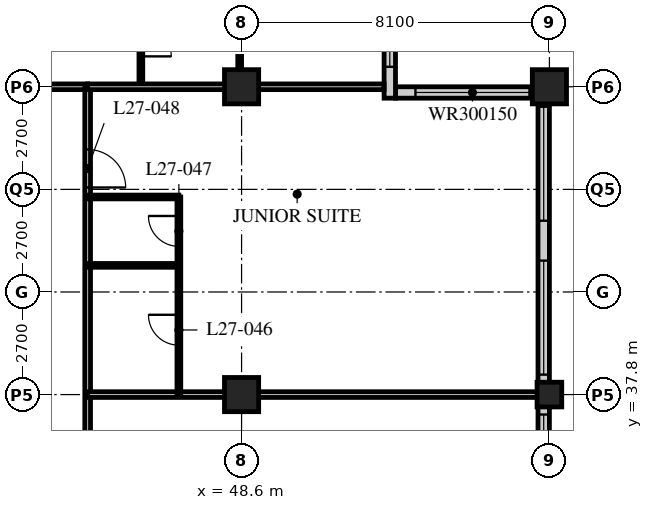
"""IFC4 building model, lengths in metres.
Left out: names, types, materials, properties, quantities, classifications, styles, units other than length and angle.
Written with IfcOpenShell. Run it as: python <this file> out.ifc"""

import sys

from ifc_helpers import new_model, si_unit, direction, frame, frame_2d, origin, origin_2d, place, context, subcontext, project, spatial, rectangle, hollow_rectangle, extrude, element, fill, save


model = new_model("IFC4")
c1 = context("Model", 3, precision=1e-05, world=origin(), true_north=direction((0.0, 1.0)))
c2 = subcontext(c1, "Body", "Model", "MODEL_VIEW")
j1 = project(units=[si_unit("LENGTHUNIT", "METRE"), si_unit("PLANEANGLEUNIT", "RADIAN")], contexts=[c1])
p1 = place(None, origin())
s1 = spatial("IfcSite", under=j1, at=p1, CompositionType="ELEMENT")
p2 = place(p1, origin())
s2 = spatial("IfcBuilding", under=s1, at=p2, CompositionType="ELEMENT")
p3 = place(p2, frame((0.0, 0.0, 110.2)))
s3 = spatial("IfcBuildingStorey", under=s2, at=p3, CompositionType="ELEMENT", Elevation=110.2)
for number, where, z_axis, x_axis in (
    (1, (48.6, 37.8, 0.0), (0.0, 0.0, 1.0), (1.0, 0.0, 0.0)),
    (2, (48.6, 45.9, 0.0), (0.0, 0.0, 1.0), (1.0, 0.0, 0.0)),
):
    element("IfcColumn", number, at=place(p3, frame(where, z_axis=z_axis, x_axis=x_axis)), inside=s3, PredefinedType="COLUMN", context=c2, shape_type="SweptSolid", body=[
        extrude(hollow_rectangle(XDim=0.9, YDim=0.9, WallThickness=0.09, at=origin_2d()), origin(), (0.0, 0.0, 1.0), 3.4),
    ])
p4 = place(p3, frame((56.7, 37.8, 0.0), z_axis=(0.0, 0.0, 1.0), x_axis=(1.0, 0.0, 0.0)))
e3 = element("IfcColumn", 3, at=p4, inside=s3, PredefinedType="COLUMN", context=c2, shape_type="SweptSolid", body=[
    extrude(hollow_rectangle(XDim=0.65, YDim=0.65, WallThickness=0.055, at=origin_2d()), origin(), (0.0, 0.0, 1.0), 3.4),
])
p5 = place(p3, frame((56.7, 45.9, 0.0), z_axis=(0.0, 0.0, 1.0), x_axis=(1.0, 0.0, 0.0)))
e4 = element("IfcColumn", 4, at=p5, inside=s3, PredefinedType="COLUMN", context=c2, shape_type="SweptSolid", body=[
    extrude(hollow_rectangle(XDim=0.9, YDim=0.9, WallThickness=0.09, at=origin_2d()), origin(), (0.0, 0.0, 1.0), 3.4),
])
p6 = place(p3, frame((56.55, 13.8, 0.0), z_axis=(0.0, 0.0, 1.0), x_axis=(0.0, 1.0, 0.0)))
e5 = element("IfcWall", 5, at=p6, inside=s3, PredefinedType="SOLIDWALL", context=c2, shape_type="SweptSolid", body=[
    extrude(rectangle(XDim=32.1, YDim=0.3, at=frame_2d((16.05, 0.0))), origin(), (0.0, 0.0, 1.0), 3.19),
])
p7 = place(p6, frame((0.225, 0.0, 0.9)))
e6 = element("IfcOpeningElement", 6, at=p7, cuts=e5, PredefinedType="OPENING", context=c2, shape_type="SweptSolid", body=[
    extrude(rectangle(XDim=3.0, YDim=2.0, at=frame_2d((1.5, 1.0))), frame((0.0, 0.16, 0.0), z_axis=(0.0, -1.0, 0.0), x_axis=(1.0, 0.0, 0.0)), (0.0, 0.0, 1.0), 0.32),
])
p8 = place(p6, frame((4.275, 0.0, 0.9)))
e7 = element("IfcOpeningElement", 7, at=p8, cuts=e5, PredefinedType="OPENING", context=c2, shape_type="SweptSolid", body=[
    extrude(rectangle(XDim=3.0, YDim=2.0, at=frame_2d((1.5, 1.0))), frame((0.0, 0.16, 0.0), z_axis=(0.0, -1.0, 0.0), x_axis=(1.0, 0.0, 0.0)), (0.0, 0.0, 1.0), 0.32),
])
p9 = place(p6, frame((8.325, 0.0, 0.9)))
e8 = element("IfcOpeningElement", 8, at=p9, cuts=e5, PredefinedType="OPENING", context=c2, shape_type="SweptSolid", body=[
    extrude(rectangle(XDim=3.0, YDim=2.0, at=frame_2d((1.5, 1.0))), frame((0.0, 0.16, 0.0), z_axis=(0.0, -1.0, 0.0), x_axis=(1.0, 0.0, 0.0)), (0.0, 0.0, 1.0), 0.32),
])
p10 = place(p6, frame((12.375, 0.0, 0.9)))
e9 = element("IfcOpeningElement", 9, at=p10, cuts=e5, PredefinedType="OPENING", context=c2, shape_type="SweptSolid", body=[
    extrude(rectangle(XDim=3.0, YDim=2.0, at=frame_2d((1.5, 1.0))), frame((0.0, 0.16, 0.0), z_axis=(0.0, -1.0, 0.0), x_axis=(1.0, 0.0, 0.0)), (0.0, 0.0, 1.0), 0.32),
])
p11 = place(p6, frame((16.425, 0.0, 0.9)))
e10 = element("IfcOpeningElement", 10, at=p11, cuts=e5, PredefinedType="OPENING", context=c2, shape_type="SweptSolid", body=[
    extrude(rectangle(XDim=3.0, YDim=2.0, at=frame_2d((1.5, 1.0))), frame((0.0, 0.16, 0.0), z_axis=(0.0, -1.0, 0.0), x_axis=(1.0, 0.0, 0.0)), (0.0, 0.0, 1.0), 0.32),
])
p12 = place(p6, frame((20.475, 0.0, 0.9)))
e11 = element("IfcOpeningElement", 11, at=p12, cuts=e5, PredefinedType="OPENING", context=c2, shape_type="SweptSolid", body=[
    extrude(rectangle(XDim=3.0, YDim=2.0, at=frame_2d((1.5, 1.0))), frame((0.0, 0.16, 0.0), z_axis=(0.0, -1.0, 0.0), x_axis=(1.0, 0.0, 0.0)), (0.0, 0.0, 1.0), 0.32),
])
p13 = place(p6, frame((24.525, 0.0, 0.9)))
e12 = element("IfcOpeningElement", 12, at=p13, cuts=e5, PredefinedType="OPENING", context=c2, shape_type="SweptSolid", body=[
    extrude(rectangle(XDim=3.0, YDim=2.0, at=frame_2d((1.5, 1.0))), frame((0.0, 0.16, 0.0), z_axis=(0.0, -1.0, 0.0), x_axis=(1.0, 0.0, 0.0)), (0.0, 0.0, 1.0), 0.32),
])
p14 = place(p6, frame((28.575, 0.0, 0.9)))
e13 = element("IfcOpeningElement", 13, at=p14, cuts=e5, PredefinedType="OPENING", context=c2, shape_type="SweptSolid", body=[
    extrude(rectangle(XDim=3.0, YDim=2.0, at=frame_2d((1.5, 1.0))), frame((0.0, 0.16, 0.0), z_axis=(0.0, -1.0, 0.0), x_axis=(1.0, 0.0, 0.0)), (0.0, 0.0, 1.0), 0.32),
])
p15 = place(p3, frame((56.4, 45.75, 0.0), z_axis=(0.0, 0.0, 1.0), x_axis=(-1.0, 0.0, 0.0)))
e14 = element("IfcWall", 14, at=p15, inside=s3, PredefinedType="SOLIDWALL", context=c2, shape_type="SweptSolid", body=[
    extrude(rectangle(XDim=3.75, YDim=0.3, at=frame_2d((1.875, 0.0))), origin(), (0.0, 0.0, 1.0), 3.19),
])
p16 = place(p15, frame((0.225, 0.0, 0.9)))
e15 = element("IfcOpeningElement", 15, at=p16, cuts=e14, PredefinedType="OPENING", context=c2, shape_type="SweptSolid", body=[
    extrude(rectangle(XDim=3.0, YDim=1.5, at=frame_2d((1.5, 0.75))), frame((0.0, 0.16, 0.0), z_axis=(0.0, -1.0, 0.0), x_axis=(1.0, 0.0, 0.0)), (0.0, 0.0, 1.0), 0.32),
])
p17 = place(p3, frame((52.5, 45.6, 0.0), z_axis=(0.0, 0.0, 1.0), x_axis=(0.0, 1.0, 0.0)))
e16 = element("IfcWall", 16, at=p17, inside=s3, PredefinedType="SOLIDWALL", context=c2, shape_type="SweptSolid", body=[
    extrude(rectangle(XDim=4.35, YDim=0.3, at=frame_2d((2.175, 0.0))), origin(), (0.0, 0.0, 1.0), 3.19),
])
p18 = place(p17, frame((0.825, 0.0, 0.9)))
e17 = element("IfcOpeningElement", 17, at=p18, cuts=e16, PredefinedType="OPENING", context=c2, shape_type="SweptSolid", body=[
    extrude(rectangle(XDim=3.0, YDim=1.5, at=frame_2d((1.5, 0.75))), frame((0.0, 0.16, 0.0), z_axis=(0.0, -1.0, 0.0), x_axis=(1.0, 0.0, 0.0)), (0.0, 0.0, 1.0), 0.32),
])
p19 = place(p3, frame((12.15, 45.9, 0.0), z_axis=(0.0, 0.0, 1.0), x_axis=(1.0, 0.0, 0.0)))
e18 = element("IfcWall", 18, at=p19, inside=s3, PredefinedType="PARTITIONING", context=c2, shape_type="SweptSolid", body=[
    extrude(rectangle(XDim=32.4, YDim=0.15, at=frame_2d((16.2, 0.0))), origin(), (0.0, 0.0, 1.0), 2.578),
])
p20 = place(p19, frame((9.5, 0.0, 0.0)))
e19 = element("IfcOpeningElement", 19, at=p20, cuts=e18, PredefinedType="OPENING", context=c2, shape_type="SweptSolid", body=[
    extrude(rectangle(XDim=1.0, YDim=2.1, at=frame_2d((0.5, 1.05))), frame((0.0, 0.085, 0.0), z_axis=(0.0, -1.0, 0.0), x_axis=(1.0, 0.0, 0.0)), (0.0, 0.0, 1.0), 0.17),
])
p21 = place(p19, frame((17.6, 0.0, 0.0)))
e20 = element("IfcOpeningElement", 20, at=p21, cuts=e18, PredefinedType="OPENING", context=c2, shape_type="SweptSolid", body=[
    extrude(rectangle(XDim=1.0, YDim=2.1, at=frame_2d((0.5, 1.05))), frame((0.0, 0.085, 0.0), z_axis=(0.0, -1.0, 0.0), x_axis=(1.0, 0.0, 0.0)), (0.0, 0.0, 1.0), 0.17),
])
p22 = place(p19, frame((25.7, 0.0, 0.0)))
e21 = element("IfcOpeningElement", 21, at=p22, cuts=e18, PredefinedType="OPENING", context=c2, shape_type="SweptSolid", body=[
    extrude(rectangle(XDim=1.0, YDim=2.1, at=frame_2d((0.5, 1.05))), frame((0.0, 0.085, 0.0), z_axis=(0.0, -1.0, 0.0), x_axis=(1.0, 0.0, 0.0)), (0.0, 0.0, 1.0), 0.17),
])
p23 = place(p19, frame((29.875, 0.0, 0.0)))
e22 = element("IfcOpeningElement", 22, at=p23, cuts=e18, PredefinedType="OPENING", context=c2, shape_type="SweptSolid", body=[
    extrude(rectangle(XDim=1.0, YDim=2.1, at=frame_2d((0.5, 1.05))), frame((0.0, 0.085, 0.0), z_axis=(0.0, -1.0, 0.0), x_axis=(1.0, 0.0, 0.0)), (0.0, 0.0, 1.0), 0.17),
])
p24 = place(p19, frame((1.525, 0.0, 0.0)))
e23 = element("IfcOpeningElement", 23, at=p24, cuts=e18, PredefinedType="OPENING", context=c2, shape_type="SweptSolid", body=[
    extrude(rectangle(XDim=1.0, YDim=2.1, at=frame_2d((0.5, 1.05))), frame((0.0, 0.085, 0.0), z_axis=(0.0, -1.0, 0.0), x_axis=(1.0, 0.0, 0.0)), (0.0, 0.0, 1.0), 0.17),
])
p25 = place(p3, frame((44.55, 21.6, 0.0), z_axis=(0.0, 0.0, 1.0), x_axis=(0.0, 1.0, 0.0)))
e24 = element("IfcWall", 24, at=p25, inside=s3, PredefinedType="PARTITIONING", context=c2, shape_type="SweptSolid", body=[
    extrude(rectangle(XDim=24.3, YDim=0.15, at=frame_2d((12.15, 0.0))), origin(), (0.0, 0.0, 1.0), 3.19),
])
p26 = place(p25, frame((2.75, 0.0, 0.0)))
e25 = element("IfcOpeningElement", 25, at=p26, cuts=e24, PredefinedType="OPENING", context=c2, shape_type="SweptSolid", body=[
    extrude(rectangle(XDim=1.0, YDim=2.1, at=frame_2d((0.5, 1.05))), frame((0.0, 0.085, 0.0), z_axis=(0.0, -1.0, 0.0), x_axis=(1.0, 0.0, 0.0)), (0.0, 0.0, 1.0), 0.17),
])
p27 = place(p25, frame((6.5, 0.0, 0.0)))
e26 = element("IfcOpeningElement", 26, at=p27, cuts=e24, PredefinedType="OPENING", context=c2, shape_type="SweptSolid", body=[
    extrude(rectangle(XDim=1.0, YDim=2.1, at=frame_2d((0.5, 1.05))), frame((0.0, 0.085, 0.0), z_axis=(0.0, -1.0, 0.0), x_axis=(1.0, 0.0, 0.0)), (0.0, 0.0, 1.0), 0.17),
])
p28 = place(p25, frame((13.55, 0.0, 0.0)))
e27 = element("IfcOpeningElement", 27, at=p28, cuts=e24, PredefinedType="OPENING", context=c2, shape_type="SweptSolid", body=[
    extrude(rectangle(XDim=1.0, YDim=2.1, at=frame_2d((0.5, 1.05))), frame((0.0, 0.085, 0.0), z_axis=(0.0, -1.0, 0.0), x_axis=(1.0, 0.0, 0.0)), (0.0, 0.0, 1.0), 0.17),
])
p29 = place(p25, frame((21.65, 0.0, 0.0)))
e28 = element("IfcOpeningElement", 28, at=p29, cuts=e24, PredefinedType="OPENING", context=c2, shape_type="SweptSolid", body=[
    extrude(rectangle(XDim=1.0, YDim=2.1, at=frame_2d((0.5, 1.05))), frame((0.0, 0.085, 0.0), z_axis=(0.0, -1.0, 0.0), x_axis=(1.0, 0.0, 0.0)), (0.0, 0.0, 1.0), 0.17),
])
p30 = place(p3, frame((44.55, 37.8, 0.0), z_axis=(0.0, 0.0, 1.0), x_axis=(1.0, 0.0, 0.0)))
e29 = element("IfcWall", 29, at=p30, inside=s3, PredefinedType="PARTITIONING", context=c2, shape_type="SweptSolid", body=[
    extrude(rectangle(XDim=11.85, YDim=0.15, at=frame_2d((5.925, 0.0))), origin(), (0.0, 0.0, 1.0), 2.578),
])
p31 = place(p3, frame((46.95, 37.8, 0.0), z_axis=(0.0, 0.0, 1.0), x_axis=(0.0, 1.0, 0.0)))
e30 = element("IfcWall", 30, at=p31, inside=s3, PredefinedType="PARTITIONING", context=c2, shape_type="SweptSolid", body=[
    extrude(rectangle(XDim=5.2, YDim=0.1, at=frame_2d((2.6, 0.0))), origin(), (0.0, 0.0, 1.0), 3.19),
])
p32 = place(p31, frame((1.3, 0.0, 0.0)))
e31 = element("IfcOpeningElement", 31, at=p32, cuts=e30, PredefinedType="OPENING", context=c2, shape_type="SweptSolid", body=[
    extrude(rectangle(XDim=0.8, YDim=2.1, at=frame_2d((0.4, 1.05))), frame((0.0, 0.06, 0.0), z_axis=(0.0, -1.0, 0.0), x_axis=(1.0, 0.0, 0.0)), (0.0, 0.0, 1.0), 0.12),
])
p33 = place(p31, frame((3.9, 0.0, 0.0)))
e32 = element("IfcOpeningElement", 32, at=p33, cuts=e30, PredefinedType="OPENING", context=c2, shape_type="SweptSolid", body=[
    extrude(rectangle(XDim=0.8, YDim=2.1, at=frame_2d((0.4, 1.05))), frame((0.0, 0.06, 0.0), z_axis=(0.0, -1.0, 0.0), x_axis=(1.0, 0.0, 0.0)), (0.0, 0.0, 1.0), 0.12),
])
for number, where, z_axis, x_axis in (
    (33, (44.55, 41.2, 0.0), (0.0, 0.0, 1.0), (1.0, 0.0, 0.0)),
    (34, (44.55, 43.0, 0.0), (0.0, 0.0, 1.0), (1.0, 0.0, 0.0)),
):
    element("IfcWall", number, at=place(p3, frame(where, z_axis=z_axis, x_axis=x_axis)), inside=s3, PredefinedType="PARTITIONING", context=c2, shape_type="SweptSolid", body=[
        extrude(rectangle(XDim=2.4, YDim=0.1, at=frame_2d((1.2, 0.0))), origin(), (0.0, 0.0, 1.0), 3.19),
    ])
p34 = place(p3, frame((45.95, 45.9, 0.0), z_axis=(0.0, 0.0, 1.0), x_axis=(0.0, 1.0, 0.0)))
e35 = element("IfcWall", 35, at=p34, inside=s3, PredefinedType="PARTITIONING", context=c2, shape_type="SweptSolid", body=[
    extrude(rectangle(XDim=2.4, YDim=0.1, at=frame_2d((1.2, 0.0))), origin(), (0.0, 0.0, 1.0), 3.19),
])
p35 = place(p34, frame((0.8, 0.0, 0.0)))
e36 = element("IfcOpeningElement", 36, at=p35, cuts=e35, PredefinedType="OPENING", context=c2, shape_type="SweptSolid", body=[
    extrude(rectangle(XDim=0.8, YDim=2.1, at=frame_2d((0.4, 1.05))), frame((0.0, 0.06, 0.0), z_axis=(0.0, -1.0, 0.0), x_axis=(1.0, 0.0, 0.0)), (0.0, 0.0, 1.0), 0.12),
])
p36 = place(p3, frame((48.55, 45.9, 0.0), z_axis=(0.0, 0.0, 1.0), x_axis=(0.0, 1.0, 0.0)))
e37 = element("IfcWall", 37, at=p36, inside=s3, PredefinedType="PARTITIONING", context=c2, shape_type="SweptSolid", body=[
    extrude(rectangle(XDim=2.4, YDim=0.1, at=frame_2d((1.2, 0.0))), origin(), (0.0, 0.0, 1.0), 2.578),
])
p37 = place(p3, frame((44.55, 45.9, 0.0), z_axis=(0.0, 0.0, 1.0), x_axis=(1.0, 0.0, 0.0)))
e38 = element("IfcWall", 38, at=p37, inside=s3, PredefinedType="PARTITIONING", context=c2, shape_type="SweptSolid", body=[
    extrude(rectangle(XDim=7.8, YDim=0.15, at=frame_2d((3.9, 0.0))), origin(), (0.0, 0.0, 1.0), 2.578),
])
p38 = place(p12, origin())
e39 = element("IfcWindow", 39, at=p38, inside=s3, PartitioningType="SINGLE_PANEL", PredefinedType="WINDOW", context=c2, shape_type="SweptSolid", body=[
    extrude(rectangle(XDim=3.0, YDim=2.0, at=frame_2d((1.5, 1.0))), frame((0.0, 0.03, 0.0), z_axis=(0.0, -1.0, 0.0), x_axis=(1.0, 0.0, 0.0)), (0.0, 0.0, 1.0), 0.06),
])
fill(e11, e39)
p39 = place(p13, origin())
e40 = element("IfcWindow", 40, at=p39, inside=s3, PartitioningType="SINGLE_PANEL", PredefinedType="WINDOW", context=c2, shape_type="SweptSolid", body=[
    extrude(rectangle(XDim=3.0, YDim=2.0, at=frame_2d((1.5, 1.0))), frame((0.0, 0.03, 0.0), z_axis=(0.0, -1.0, 0.0), x_axis=(1.0, 0.0, 0.0)), (0.0, 0.0, 1.0), 0.06),
])
fill(e12, e40)
p40 = place(p14, origin())
e41 = element("IfcWindow", 41, at=p40, inside=s3, PartitioningType="SINGLE_PANEL", PredefinedType="WINDOW", context=c2, shape_type="SweptSolid", body=[
    extrude(rectangle(XDim=3.0, YDim=2.0, at=frame_2d((1.5, 1.0))), frame((0.0, 0.03, 0.0), z_axis=(0.0, -1.0, 0.0), x_axis=(1.0, 0.0, 0.0)), (0.0, 0.0, 1.0), 0.06),
])
fill(e13, e41)
p41 = place(p16, origin())
e42 = element("IfcWindow", 42, at=p41, inside=s3, PartitioningType="SINGLE_PANEL", PredefinedType="WINDOW", context=c2, shape_type="SweptSolid", body=[
    extrude(rectangle(XDim=3.0, YDim=1.5, at=frame_2d((1.5, 0.75))), frame((0.0, 0.03, 0.0), z_axis=(0.0, -1.0, 0.0), x_axis=(1.0, 0.0, 0.0)), (0.0, 0.0, 1.0), 0.06),
])
fill(e15, e42)
p42 = place(p18, origin())
e43 = element("IfcWindow", 43, at=p42, inside=s3, PartitioningType="SINGLE_PANEL", PredefinedType="WINDOW", context=c2, shape_type="SweptSolid", body=[
    extrude(rectangle(XDim=3.0, YDim=1.5, at=frame_2d((1.5, 0.75))), frame((0.0, 0.03, 0.0), z_axis=(0.0, -1.0, 0.0), x_axis=(1.0, 0.0, 0.0)), (0.0, 0.0, 1.0), 0.06),
])
fill(e17, e43)
p43 = place(p32, origin())
e44 = element("IfcDoor", 44, at=p43, inside=s3, OperationType="SINGLE_SWING_RIGHT", PredefinedType="DOOR", context=c2, shape_type="SweptSolid", body=[
    extrude(rectangle(XDim=0.8, YDim=2.1, at=frame_2d((0.4, 1.05))), frame((0.0, 0.025, 0.0), z_axis=(0.0, -1.0, 0.0), x_axis=(1.0, 0.0, 0.0)), (0.0, 0.0, 1.0), 0.05),
])
fill(e31, e44)
p44 = place(p33, origin())
e45 = element("IfcDoor", 45, at=p44, inside=s3, OperationType="SINGLE_SWING_RIGHT", PredefinedType="DOOR", context=c2, shape_type="SweptSolid", body=[
    extrude(rectangle(XDim=0.8, YDim=2.1, at=frame_2d((0.4, 1.05))), frame((0.0, 0.025, 0.0), z_axis=(0.0, -1.0, 0.0), x_axis=(1.0, 0.0, 0.0)), (0.0, 0.0, 1.0), 0.05),
])
fill(e32, e45)
p45 = place(p29, origin())
e46 = element("IfcDoor", 46, at=p45, inside=s3, OperationType="SINGLE_SWING_RIGHT", PredefinedType="DOOR", context=c2, shape_type="SweptSolid", body=[
    extrude(rectangle(XDim=1.0, YDim=2.1, at=frame_2d((0.5, 1.05))), frame((0.0, 0.025, 0.0), z_axis=(0.0, -1.0, 0.0), x_axis=(1.0, 0.0, 0.0)), (0.0, 0.0, 1.0), 0.05),
])
fill(e28, e46)
p46 = place(p35, origin())
e47 = element("IfcDoor", 47, at=p46, inside=s3, OperationType="SINGLE_SWING_RIGHT", PredefinedType="DOOR", context=c2, shape_type="SweptSolid", body=[
    extrude(rectangle(XDim=0.8, YDim=2.1, at=frame_2d((0.4, 1.05))), frame((0.0, 0.025, 0.0), z_axis=(0.0, -1.0, 0.0), x_axis=(1.0, 0.0, 0.0)), (0.0, 0.0, 1.0), 0.05),
])
fill(e36, e47)
save(model, sys.argv[1])
